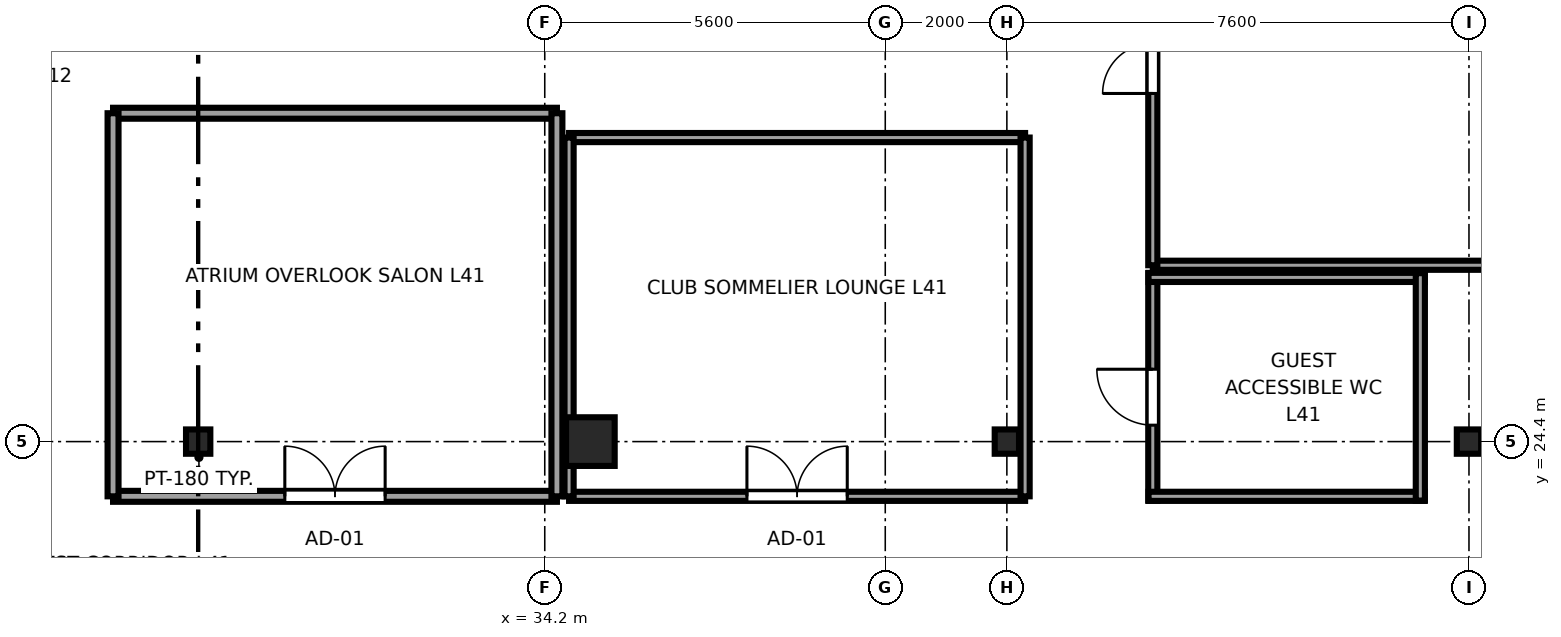
"""IFC4 building model, lengths in metres.
Left out: names, types, materials, properties, quantities, classifications, styles, units other than length and angle.
Written with IfcOpenShell. Run it as: python <this file> out.ifc"""

import sys

from ifc_helpers import new_model, si_unit, direction, frame, frame_2d, origin, origin_2d, place, context, subcontext, project, spatial, rectangle, i_section, extrude, source, transform, mapped, element, fill, save


model = new_model("IFC4")
c1 = context("Model", 3, precision=1e-05, world=origin(), true_north=direction((0.0, 1.0)))
c2 = subcontext(c1, "Body", "Model", "MODEL_VIEW")
j1 = project(units=[si_unit("LENGTHUNIT", "METRE"), si_unit("PLANEANGLEUNIT", "RADIAN")], contexts=[c1])
p1 = place(None, origin())
s1 = spatial("IfcSite", under=j1, at=p1, CompositionType="ELEMENT")
p2 = place(p1, origin())
s2 = spatial("IfcBuilding", under=s1, at=p2, CompositionType="ELEMENT")
p3 = place(p2, frame((0.0, 0.0, 157.7)))
s3 = spatial("IfcBuildingStorey", under=s2, at=p3, CompositionType="ELEMENT", Elevation=157.7)
m1 = source(origin(), c2, "Body", "SweptSolid", [
    extrude(rectangle(XDim=0.8, YDim=0.8, at=origin_2d()), origin(), (0.0, 0.0, 1.0), 3.55),
])
p4 = place(p3, frame((34.95, 24.4, 0.0), z_axis=(0.0, 0.0, 1.0), x_axis=(1.0, 0.0, 0.0)))
e1 = element("IfcColumn", 1, at=p4, inside=s3, PredefinedType="COLUMN", context=c2, shape_type="MappedRepresentation", body=[
    mapped(m1, transform((0.0, 0.0, 0.0), x_axis=(1.0, 0.0, 0.0), y_axis=(0.0, 1.0, 0.0), z_axis=(0.0, 0.0, 1.0), scale=1.0)),
])
m2 = source(origin(), c2, "Body", "SweptSolid", [
    extrude(i_section(OverallWidth=0.4, OverallDepth=0.4, WebThickness=0.02, FlangeThickness=0.035, at=origin_2d()), origin(), (0.0, 0.0, 1.0), 3.55),
])
for number, where, z_axis, x_axis in (
    (2, (41.8, 24.4, 0.0), (0.0, 0.0, 1.0), (1.0, 0.0, 0.0)),
    (3, (49.4, 24.4, 0.0), (0.0, 0.0, 1.0), (1.0, 0.0, 0.0)),
    (4, (28.5, 24.4, 0.0), (0.0, 0.0, 1.0), (1.0, 0.0, 0.0)),
):
    element("IfcColumn", number, at=place(p3, frame(where, z_axis=z_axis, x_axis=x_axis)), inside=s3, PredefinedType="COLUMN", context=c2, shape_type="MappedRepresentation", body=[
        mapped(m2, transform((0.0, 0.0, 0.0), x_axis=(1.0, 0.0, 0.0), y_axis=(0.0, 1.0, 0.0), z_axis=(0.0, 0.0, 1.0), scale=1.0)),
    ])
p5 = place(p3, frame((44.2, 23.43, 0.0), z_axis=(0.0, 0.0, 1.0), x_axis=(0.0, 1.0, 0.0)))
e5 = element("IfcWall", 5, at=p5, inside=s3, PredefinedType="PARTITIONING", context=c2, shape_type="SweptSolid", body=[
    extrude(rectangle(XDim=3.74, YDim=0.15, at=frame_2d((1.87, 0.0))), origin(), (0.0, 0.0, 1.0), 3.37),
])
p6 = place(p5, frame((1.24, 0.0, 0.0)))
e6 = element("IfcOpeningElement", 6, at=p6, cuts=e5, PredefinedType="OPENING", context=c2, shape_type="SweptSolid", body=[
    extrude(rectangle(XDim=0.92, YDim=2.01, at=frame_2d((0.46, 1.005))), frame((0.0, 0.085, 0.0), z_axis=(0.0, -1.0, 0.0), x_axis=(1.0, 0.0, 0.0)), (0.0, 0.0, 1.0), 0.17),
])
for number, where, z_axis, x_axis in (
    (7, (44.13, 23.5, 0.0), (0.0, 0.0, 1.0), (1.0, 0.0, 0.0)),
    (8, (44.13, 27.1, 0.0), (0.0, 0.0, 1.0), (1.0, 0.0, 0.0)),
):
    element("IfcWall", number, at=place(p3, frame(where, z_axis=z_axis, x_axis=x_axis)), inside=s3, PredefinedType="PARTITIONING", context=c2, shape_type="SweptSolid", body=[
        extrude(rectangle(XDim=4.54, YDim=0.15, at=frame_2d((2.27, 0.0))), origin(), (0.0, 0.0, 1.0), 3.37),
    ])
p7 = place(p3, frame((48.6, 23.43, 0.0), z_axis=(0.0, 0.0, 1.0), x_axis=(0.0, 1.0, 0.0)))
e9 = element("IfcWall", 9, at=p7, inside=s3, PredefinedType="PARTITIONING", context=c2, shape_type="SweptSolid", body=[
    extrude(rectangle(XDim=3.74, YDim=0.15, at=frame_2d((1.87, 0.0))), origin(), (0.0, 0.0, 1.0), 3.37),
])
p8 = place(p3, frame((44.2, 27.3, 0.0), z_axis=(0.0, 0.0, 1.0), x_axis=(1.0, 0.0, 0.0)))
e10 = element("IfcWall", 10, at=p8, inside=s3, PredefinedType="PARTITIONING", context=c2, shape_type="SweptSolid", body=[
    extrude(rectangle(XDim=9.795, YDim=0.15, at=frame_2d((4.897, 0.0))), origin(), (0.0, 0.0, 1.0), 3.37),
])
p9 = place(p3, frame((44.2, 27.3, 0.0), z_axis=(0.0, 0.0, 1.0), x_axis=(0.0, 1.0, 0.0)))
e11 = element("IfcWall", 11, at=p9, inside=s3, PredefinedType="PARTITIONING", context=c2, shape_type="SweptSolid", body=[
    extrude(rectangle(XDim=7.3, YDim=0.15, at=frame_2d((3.65, 0.0))), origin(), (0.0, 0.0, 1.0), 3.37),
])
p10 = place(p9, frame((2.825, 0.0, 0.0)))
e12 = element("IfcOpeningElement", 12, at=p10, cuts=e11, PredefinedType="OPENING", context=c2, shape_type="SweptSolid", body=[
    extrude(rectangle(XDim=1.65, YDim=2.15, at=frame_2d((0.825, 1.075))), frame((0.0, 0.085, 0.0), z_axis=(0.0, -1.0, 0.0), x_axis=(1.0, 0.0, 0.0)), (0.0, 0.0, 1.0), 0.17),
])
p11 = place(p3, frame((27.1, 23.5, 0.0), z_axis=(0.0, 0.0, 1.0), x_axis=(1.0, 0.0, 0.0)))
e13 = element("IfcWall", 13, at=p11, inside=s3, PredefinedType="PARTITIONING", context=c2, shape_type="SweptSolid", body=[
    extrude(rectangle(XDim=7.3, YDim=0.18, at=frame_2d((3.65, 0.0))), origin(), (0.0, 0.0, 1.0), 3.37),
])
p12 = place(p11, frame((2.825, 0.0, 0.0)))
e14 = element("IfcOpeningElement", 14, at=p12, cuts=e13, PredefinedType="OPENING", context=c2, shape_type="SweptSolid", body=[
    extrude(rectangle(XDim=1.65, YDim=2.15, at=frame_2d((0.825, 1.075))), frame((0.0, 0.1, 0.0), z_axis=(0.0, -1.0, 0.0), x_axis=(1.0, 0.0, 0.0)), (0.0, 0.0, 1.0), 0.2),
])
p13 = place(p3, frame((27.1, 29.8, 0.0), z_axis=(0.0, 0.0, 1.0), x_axis=(1.0, 0.0, 0.0)))
e15 = element("IfcWall", 15, at=p13, inside=s3, PredefinedType="PARTITIONING", context=c2, shape_type="SweptSolid", body=[
    extrude(rectangle(XDim=7.3, YDim=0.18, at=frame_2d((3.65, 0.0))), origin(), (0.0, 0.0, 1.0), 3.37),
])
for number, where, z_axis, x_axis in (
    (16, (27.1, 23.5, 0.0), (0.0, 0.0, 1.0), (0.0, 1.0, 0.0)),
    (17, (34.4, 23.5, 0.0), (0.0, 0.0, 1.0), (0.0, 1.0, 0.0)),
):
    element("IfcWall", number, at=place(p3, frame(where, z_axis=z_axis, x_axis=x_axis)), inside=s3, PredefinedType="PARTITIONING", context=c2, shape_type="SweptSolid", body=[
        extrude(rectangle(XDim=6.3, YDim=0.18, at=frame_2d((3.15, 0.0))), origin(), (0.0, 0.0, 1.0), 3.37),
    ])
p14 = place(p3, frame((34.6, 23.5, 0.0), z_axis=(0.0, 0.0, 1.0), x_axis=(1.0, 0.0, 0.0)))
e18 = element("IfcWall", 18, at=p14, inside=s3, PredefinedType="PARTITIONING", context=c2, shape_type="SweptSolid", body=[
    extrude(rectangle(XDim=7.5, YDim=0.15, at=frame_2d((3.75, 0.0))), origin(), (0.0, 0.0, 1.0), 3.37),
])
p15 = place(p14, frame((2.925, 0.0, 0.0)))
e19 = element("IfcOpeningElement", 19, at=p15, cuts=e18, PredefinedType="OPENING", context=c2, shape_type="SweptSolid", body=[
    extrude(rectangle(XDim=1.65, YDim=2.15, at=frame_2d((0.825, 1.075))), frame((0.0, 0.085, 0.0), z_axis=(0.0, -1.0, 0.0), x_axis=(1.0, 0.0, 0.0)), (0.0, 0.0, 1.0), 0.17),
])
p16 = place(p3, frame((34.6, 29.4, 0.0), z_axis=(0.0, 0.0, 1.0), x_axis=(1.0, 0.0, 0.0)))
e20 = element("IfcWall", 20, at=p16, inside=s3, PredefinedType="PARTITIONING", context=c2, shape_type="SweptSolid", body=[
    extrude(rectangle(XDim=7.5, YDim=0.15, at=frame_2d((3.75, 0.0))), origin(), (0.0, 0.0, 1.0), 3.37),
])
p17 = place(p3, frame((34.6, 23.5, 0.0), z_axis=(0.0, 0.0, 1.0), x_axis=(0.0, 1.0, 0.0)))
e21 = element("IfcWall", 21, at=p17, inside=s3, PredefinedType="PARTITIONING", context=c2, shape_type="SweptSolid", body=[
    extrude(rectangle(XDim=5.9, YDim=0.15, at=frame_2d((2.95, 0.0))), origin(), (0.0, 0.0, 1.0), 3.37),
])
p18 = place(p3, frame((42.1, 23.5, 0.0), z_axis=(0.0, 0.0, 1.0), x_axis=(0.0, 1.0, 0.0)))
e22 = element("IfcWall", 22, at=p18, inside=s3, PredefinedType="PARTITIONING", context=c2, shape_type="SweptSolid", body=[
    extrude(rectangle(XDim=5.9, YDim=0.15, at=frame_2d((2.95, 0.0))), origin(), (0.0, 0.0, 1.0), 2.16),
])
m3 = source(origin(), c2, "Body", "SweptSolid", [
    extrude(rectangle(XDim=0.92, YDim=2.01, at=frame_2d((0.46, 1.005))), frame((0.0, 0.025, 0.0), z_axis=(0.0, -1.0, 0.0), x_axis=(1.0, 0.0, 0.0)), (0.0, 0.0, 1.0), 0.05),
])
p19 = place(p6, origin())
e23 = element("IfcDoor", 23, at=p19, inside=s3, OperationType="SINGLE_SWING_RIGHT", PredefinedType="DOOR", context=c2, shape_type="MappedRepresentation", body=[
    mapped(m3, transform((0.0, 0.0, 0.0), x_axis=(1.0, 0.0, 0.0), y_axis=(0.0, 1.0, 0.0), z_axis=(0.0, 0.0, 1.0), scale=1.0)),
])
fill(e6, e23)
m4 = source(origin(), c2, "Body", "SweptSolid", [
    extrude(rectangle(XDim=1.65, YDim=2.15, at=frame_2d((0.825, 1.075))), frame((0.0, 0.025, 0.0), z_axis=(0.0, -1.0, 0.0), x_axis=(1.0, 0.0, 0.0)), (0.0, 0.0, 1.0), 0.05),
])
p20 = place(p10, origin())
e24 = element("IfcDoor", 24, at=p20, inside=s3, OperationType="DOUBLE_DOOR_SINGLE_SWING", PredefinedType="DOOR", context=c2, shape_type="MappedRepresentation", body=[
    mapped(m4, transform((0.0, 0.0, 0.0), x_axis=(1.0, 0.0, 0.0), y_axis=(0.0, 1.0, 0.0), z_axis=(0.0, 0.0, 1.0), scale=1.0)),
])
fill(e12, e24)
p21 = place(p12, origin())
e25 = element("IfcDoor", 25, at=p21, inside=s3, OperationType="DOUBLE_DOOR_SINGLE_SWING", PredefinedType="DOOR", context=c2, shape_type="MappedRepresentation", body=[
    mapped(m4, transform((0.0, 0.0, 0.0), x_axis=(1.0, 0.0, 0.0), y_axis=(0.0, 1.0, 0.0), z_axis=(0.0, 0.0, 1.0), scale=1.0)),
])
fill(e14, e25)
p22 = place(p15, origin())
e26 = element("IfcDoor", 26, at=p22, inside=s3, OperationType="DOUBLE_DOOR_SINGLE_SWING", PredefinedType="DOOR", context=c2, shape_type="MappedRepresentation", body=[
    mapped(m4, transform((0.0, 0.0, 0.0), x_axis=(1.0, 0.0, 0.0), y_axis=(0.0, 1.0, 0.0), z_axis=(0.0, 0.0, 1.0), scale=1.0)),
])
fill(e19, e26)
save(model, sys.argv[1])
